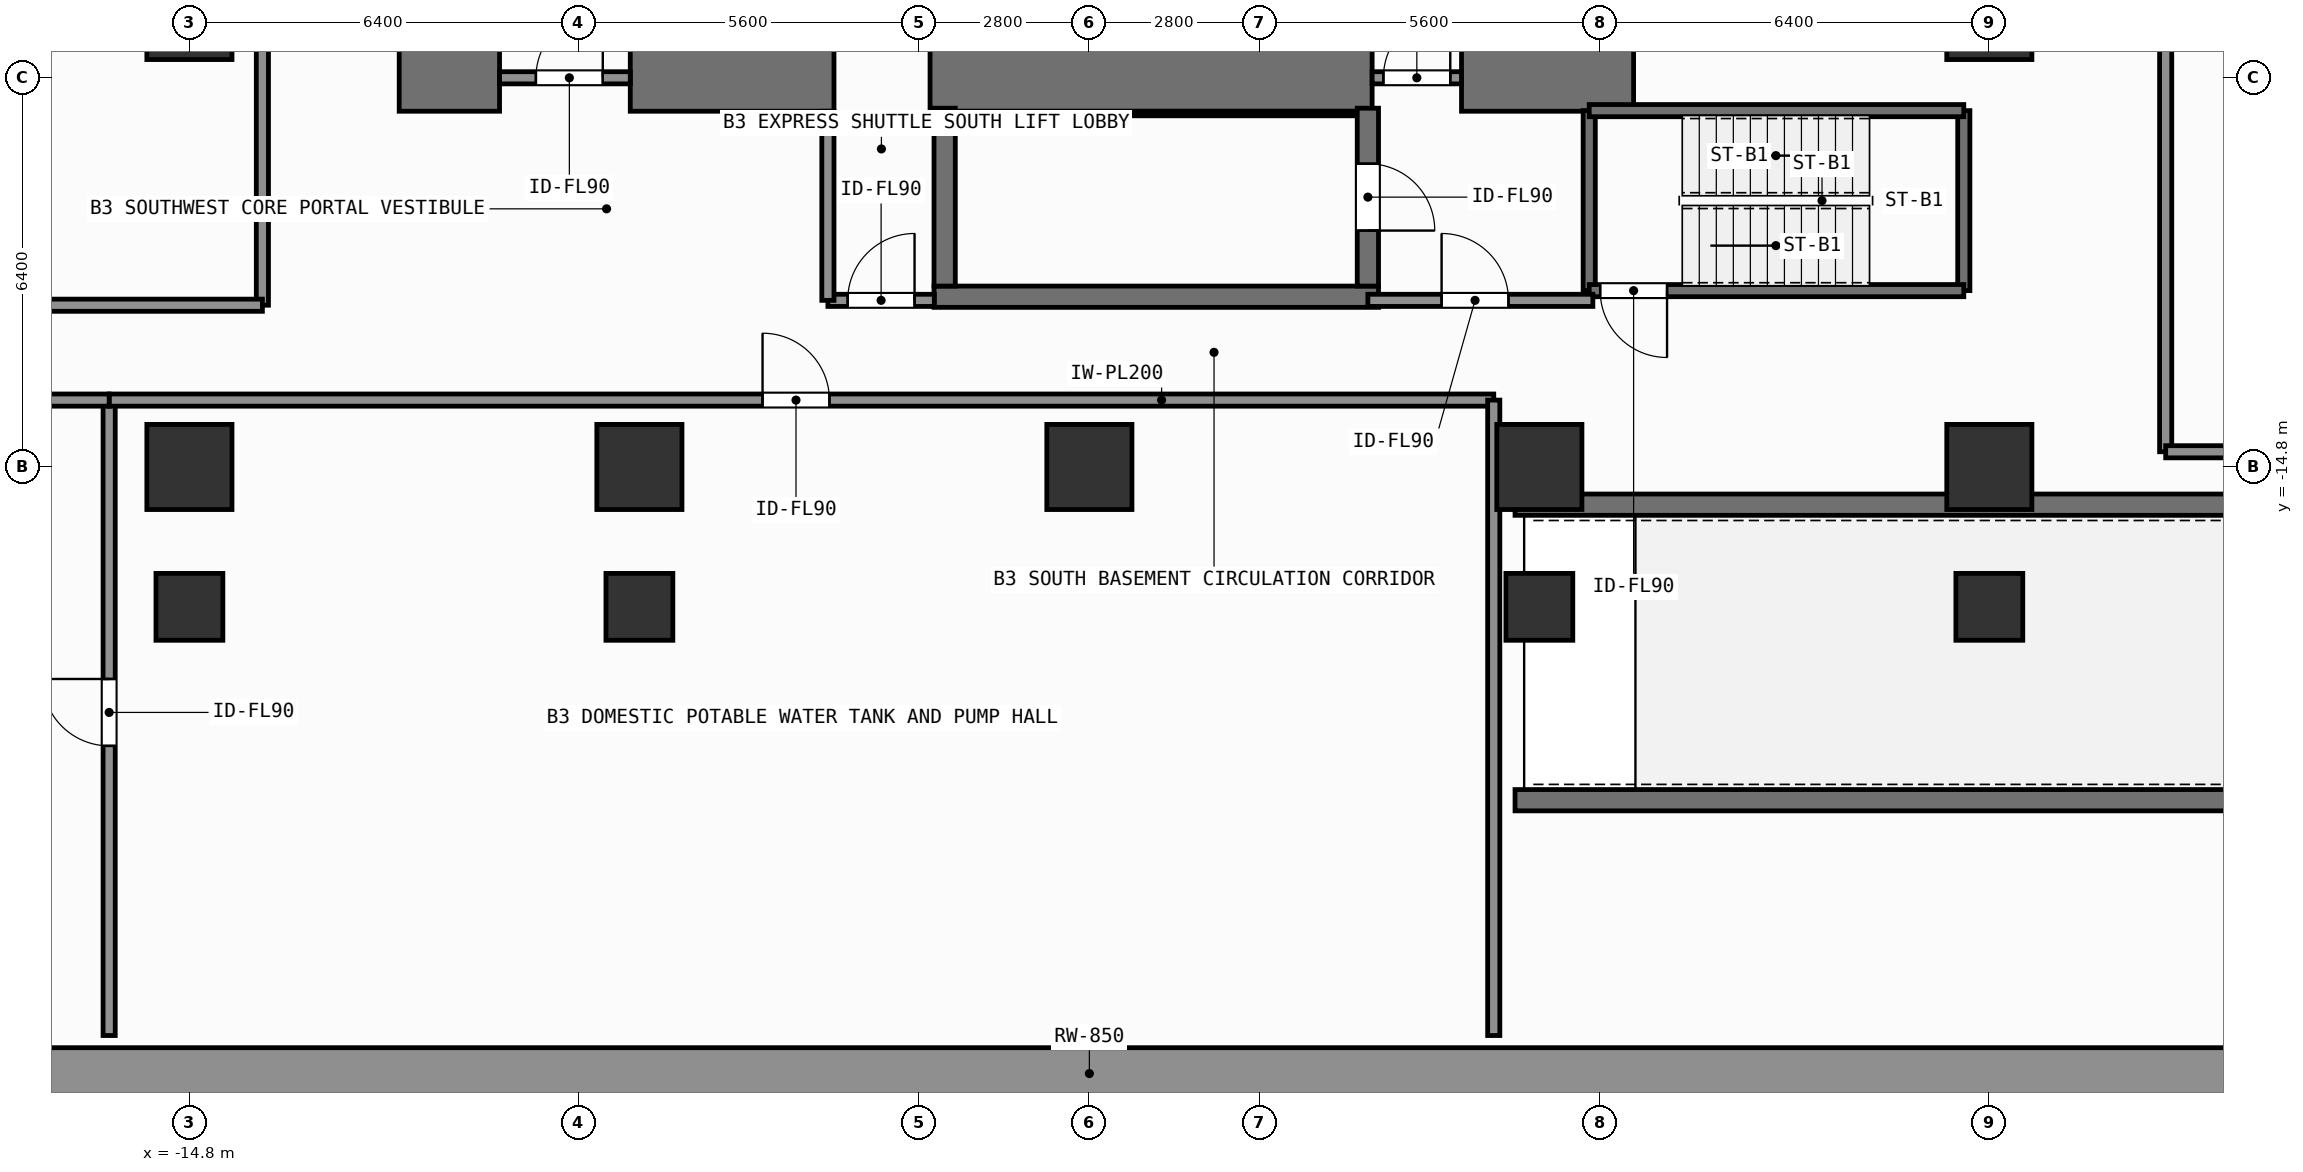
"""IFC4 building model, lengths in metres.
Left out: names, types, materials, properties, quantities, classifications, styles, units other than length and angle.
Written with IfcOpenShell. Run it as: python <this file> out.ifc"""

import sys

from ifc_helpers import new_model, si_unit, direction, frame, frame_2d, origin, origin_2d, place, context, subcontext, project, spatial, rectangle, extrude, element, fill, save


model = new_model("IFC4")
c1 = context("Model", 3, precision=1e-05, world=origin(), true_north=direction((0.0, 1.0)))
c2 = subcontext(c1, "Body", "Model", "MODEL_VIEW")
j1 = project(units=[si_unit("LENGTHUNIT", "METRE"), si_unit("PLANEANGLEUNIT", "RADIAN")], contexts=[c1])
p1 = place(None, origin())
s1 = spatial("IfcSite", under=j1, at=p1, CompositionType="ELEMENT")
p2 = place(p1, origin())
s2 = spatial("IfcBuilding", under=s1, at=p2, CompositionType="ELEMENT")
p3 = place(p2, frame((0.0, 0.0, -12.6)))
s3 = spatial("IfcBuildingStorey", under=s2, at=p3, CompositionType="ELEMENT", Elevation=-12.6)
p4 = place(p3, frame((-33.6, -24.775, 0.0), z_axis=(0.0, 0.0, 1.0), x_axis=(1.0, 0.0, 0.0)))
e1 = element("IfcWall", 1, at=p4, inside=s3, PredefinedType="SOLIDWALL", context=c2, shape_type="SweptSolid", body=[
    extrude(rectangle(XDim=67.2, YDim=0.85, at=frame_2d((33.6, 0.0))), origin(), (0.0, 0.0, 1.0), 4.2),
])
p5 = place(p3, frame((7.0, -20.28, 0.0), z_axis=(0.0, 0.0, 1.0), x_axis=(1.0, 0.0, 0.0)))
e2 = element("IfcWall", 2, at=p5, inside=s3, PredefinedType="SHEAR", context=c2, shape_type="SweptSolid", body=[
    extrude(rectangle(XDim=25.5, YDim=0.35, at=frame_2d((12.75, 0.0))), origin(), (0.0, 0.0, 1.0), 4.2),
])
p6 = place(p3, frame((7.0, -15.42, 0.0), z_axis=(0.0, 0.0, 1.0), x_axis=(1.0, 0.0, 0.0)))
e3 = element("IfcWall", 3, at=p6, inside=s3, PredefinedType="SHEAR", context=c2, shape_type="SweptSolid", body=[
    extrude(rectangle(XDim=25.75, YDim=0.35, at=frame_2d((12.875, 0.0))), origin(), (0.0, 0.0, 1.0), 4.2),
])
p7 = place(p3, frame((-11.35, -8.4, 0.0), z_axis=(0.0, 0.0, 1.0), x_axis=(1.0, 0.0, 0.0)))
e4 = element("IfcWall", 4, at=p7, inside=s3, PredefinedType="SHEAR", context=c2, shape_type="SweptSolid", body=[
    extrude(rectangle(XDim=1.65, YDim=1.1, at=frame_2d((0.825, 0.0))), origin(), (0.0, 0.0, 1.0), 4.2),
])
p8 = place(p3, frame((-7.55, -8.4, 0.0), z_axis=(0.0, 0.0, 1.0), x_axis=(1.0, 0.0, 0.0)))
e5 = element("IfcWall", 5, at=p8, inside=s3, PredefinedType="SHEAR", context=c2, shape_type="SweptSolid", body=[
    extrude(rectangle(XDim=3.35, YDim=1.1, at=frame_2d((1.675, 0.0))), origin(), (0.0, 0.0, 1.0), 4.2),
])
p9 = place(p3, frame((-2.62, -8.4, 0.0), z_axis=(0.0, 0.0, 1.0), x_axis=(1.0, 0.0, 0.0)))
e6 = element("IfcWall", 6, at=p9, inside=s3, PredefinedType="SHEAR", context=c2, shape_type="SweptSolid", body=[
    extrude(rectangle(XDim=7.27, YDim=1.1, at=frame_2d((3.635, 0.0))), origin(), (0.0, 0.0, 1.0), 4.2),
])
p10 = place(p3, frame((6.12, -8.4, 0.0), z_axis=(0.0, 0.0, 1.0), x_axis=(1.0, 0.0, 0.0)))
e7 = element("IfcWall", 7, at=p10, inside=s3, PredefinedType="SHEAR", context=c2, shape_type="SweptSolid", body=[
    extrude(rectangle(XDim=2.83, YDim=1.1, at=frame_2d((1.415, 0.0))), origin(), (0.0, 0.0, 1.0), 4.2),
])
p11 = place(p3, frame((-2.555, -12.0, 0.0), z_axis=(0.0, 0.0, 1.0), x_axis=(1.0, 0.0, 0.0)))
e8 = element("IfcWall", 8, at=p11, inside=s3, PredefinedType="SHEAR", context=c2, shape_type="SweptSolid", body=[
    extrude(rectangle(XDim=7.31, YDim=0.35, at=frame_2d((3.655, 0.0))), origin(), (0.0, 0.0, 1.0), 4.2),
])
p12 = place(p3, frame((-2.2, -8.988, 0.0), z_axis=(0.0, 0.0, 1.0), x_axis=(1.0, 0.0, 0.0)))
e9 = element("IfcWall", 9, at=p12, inside=s3, PredefinedType="SHEAR", context=c2, shape_type="SweptSolid", body=[
    extrude(rectangle(XDim=6.6, YDim=0.075, at=frame_2d((3.3, 0.0))), origin(), (0.0, 0.0, 1.0), 4.2),
])
p13 = place(p3, frame((-2.38, -11.825, 0.0), z_axis=(0.0, 0.0, 1.0), x_axis=(0.0, 1.0, 0.0)))
e10 = element("IfcWall", 10, at=p13, inside=s3, PredefinedType="SHEAR", context=c2, shape_type="SweptSolid", body=[
    extrude(rectangle(XDim=2.925, YDim=0.35, at=frame_2d((1.462, 0.0))), origin(), (0.0, 0.0, 1.0), 4.2),
])
p14 = place(p3, frame((4.58, -8.9, 0.0), z_axis=(0.0, 0.0, 1.0), x_axis=(0.0, -1.0, 0.0)))
e11 = element("IfcWall", 11, at=p14, inside=s3, PredefinedType="SHEAR", context=c2, shape_type="SweptSolid", body=[
    extrude(rectangle(XDim=2.925, YDim=0.35, at=frame_2d((1.462, 0.0))), origin(), (0.0, 0.0, 1.0), 4.2),
])
p15 = place(p14, frame((0.913, 0.0, 0.0)))
e12 = element("IfcOpeningElement", 12, at=p15, cuts=e11, PredefinedType="OPENING", context=c2, shape_type="SweptSolid", body=[
    extrude(rectangle(XDim=1.1, YDim=2.15, at=frame_2d((0.55, 1.075))), frame((0.0, 0.185, 0.0), z_axis=(0.0, -1.0, 0.0), x_axis=(1.0, 0.0, 0.0)), (0.0, 0.0, 1.0), 0.37),
])
for number, where, z_axis, x_axis in (
    (13, (-14.8, -14.8, 0.0), (0.0, 0.0, 1.0), (1.0, 0.0, 0.0)),
    (14, (-7.4, -14.8, 0.0), (0.0, 0.0, 1.0), (1.0, 0.0, 0.0)),
    (15, (0.0, -14.8, 0.0), (0.0, 0.0, 1.0), (1.0, 0.0, 0.0)),
    (16, (7.4, -14.8, 0.0), (0.0, 0.0, 1.0), (1.0, 0.0, 0.0)),
    (17, (14.8, -14.8, 0.0), (0.0, 0.0, 1.0), (1.0, 0.0, 0.0)),
    (18, (-14.8, -7.4, 0.0), (0.0, 0.0, 1.0), (1.0, 0.0, 0.0)),
    (19, (14.8, -7.4, 0.0), (0.0, 0.0, 1.0), (1.0, 0.0, 0.0)),
):
    element("IfcColumn", number, at=place(p3, frame(where, z_axis=z_axis, x_axis=x_axis)), inside=s3, PredefinedType="COLUMN", context=c2, shape_type="SweptSolid", body=[
        extrude(rectangle(XDim=1.4, YDim=1.4, at=origin_2d()), origin(), (0.0, 0.0, 1.0), 4.2),
    ])
for number, where, z_axis, x_axis in (
    (20, (-14.8, -17.1, 0.0), (0.0, 0.0, 1.0), (1.0, 0.0, 0.0)),
    (21, (-7.4, -17.1, 0.0), (0.0, 0.0, 1.0), (1.0, 0.0, 0.0)),
    (22, (7.4, -17.1, 0.0), (0.0, 0.0, 1.0), (1.0, 0.0, 0.0)),
    (23, (14.8, -17.1, 0.0), (0.0, 0.0, 1.0), (1.0, 0.0, 0.0)),
):
    element("IfcColumn", number, at=place(p3, frame(where, z_axis=z_axis, x_axis=x_axis)), inside=s3, PredefinedType="COLUMN", context=c2, shape_type="SweptSolid", body=[
        extrude(rectangle(XDim=1.1, YDim=1.1, at=origin_2d()), origin(), (0.0, 0.0, 1.0), 4.2),
    ])
for number, where, z_axis, x_axis in (
    (24, (8.22, -11.9, 0.0), (0.0, 0.0, 1.0), (0.0, 1.0, 0.0)),
    (25, (14.38, -8.94, 0.0), (0.0, 0.0, 1.0), (0.0, -1.0, 0.0)),
):
    element("IfcWall", number, at=place(p3, frame(where, z_axis=z_axis, x_axis=x_axis)), inside=s3, PredefinedType="SHEAR", context=c2, shape_type="SweptSolid", body=[
        extrude(rectangle(XDim=2.96, YDim=0.2, at=frame_2d((1.48, 0.0))), origin(), (0.0, 0.0, 1.0), 3.94),
    ])
p16 = place(p3, frame((14.38, -11.9, 0.0), z_axis=(0.0, 0.0, 1.0), x_axis=(-1.0, 0.0, 0.0)))
e26 = element("IfcWall", 26, at=p16, inside=s3, PredefinedType="SHEAR", context=c2, shape_type="SweptSolid", body=[
    extrude(rectangle(XDim=6.16, YDim=0.2, at=frame_2d((3.08, 0.0))), origin(), (0.0, 0.0, 1.0), 3.94),
])
p17 = place(p16, frame((4.88, 0.0, 0.0)))
e27 = element("IfcOpeningElement", 27, at=p17, cuts=e26, PredefinedType="OPENING", context=c2, shape_type="SweptSolid", body=[
    extrude(rectangle(XDim=1.1, YDim=2.15, at=frame_2d((0.55, 1.075))), frame((0.0, 0.11, 0.0), z_axis=(0.0, -1.0, 0.0), x_axis=(1.0, 0.0, 0.0)), (0.0, 0.0, 1.0), 0.22),
])
p18 = place(p3, frame((8.22, -8.94, 0.0), z_axis=(0.0, 0.0, 1.0), x_axis=(1.0, 0.0, 0.0)))
e28 = element("IfcWall", 28, at=p18, inside=s3, PredefinedType="SHEAR", context=c2, shape_type="SweptSolid", body=[
    extrude(rectangle(XDim=6.16, YDim=0.2, at=frame_2d((3.08, 0.0))), origin(), (0.0, 0.0, 1.0), 3.94),
])
p19 = place(p3, frame((4.58, -12.06, 0.0), z_axis=(0.0, 0.0, 1.0), x_axis=(1.0, 0.0, 0.0)))
e29 = element("IfcWall", 29, at=p19, inside=s3, PredefinedType="SOLIDWALL", context=c2, shape_type="SweptSolid", body=[
    extrude(rectangle(XDim=3.7, YDim=0.2, at=frame_2d((1.85, 0.0))), origin(), (0.0, 0.0, 1.0), 3.94),
])
p20 = place(p19, frame((1.212, 0.0, 0.0)))
e30 = element("IfcOpeningElement", 30, at=p20, cuts=e29, PredefinedType="OPENING", context=c2, shape_type="SweptSolid", body=[
    extrude(rectangle(XDim=1.1, YDim=2.15, at=frame_2d((0.55, 1.075))), frame((0.0, 0.11, 0.0), z_axis=(0.0, -1.0, 0.0), x_axis=(1.0, 0.0, 0.0)), (0.0, 0.0, 1.0), 0.22),
])
p21 = place(p3, frame((4.65, -8.4, 0.0), z_axis=(0.0, 0.0, 1.0), x_axis=(1.0, 0.0, 0.0)))
e31 = element("IfcWall", 31, at=p21, inside=s3, PredefinedType="SOLIDWALL", context=c2, shape_type="SweptSolid", body=[
    extrude(rectangle(XDim=1.47, YDim=0.2, at=frame_2d((0.735, 0.0))), origin(), (0.0, 0.0, 1.0), 2.98),
])
p22 = place(p21, frame((0.185, 0.0, 0.0)))
e32 = element("IfcOpeningElement", 32, at=p22, cuts=e31, PredefinedType="OPENING", context=c2, shape_type="SweptSolid", body=[
    extrude(rectangle(XDim=1.1, YDim=2.15, at=frame_2d((0.55, 1.075))), frame((0.0, 0.11, 0.0), z_axis=(0.0, -1.0, 0.0), x_axis=(1.0, 0.0, 0.0)), (0.0, 0.0, 1.0), 0.22),
])
p23 = place(p3, frame((-9.7, -8.4, 0.0), z_axis=(0.0, 0.0, 1.0), x_axis=(1.0, 0.0, 0.0)))
e33 = element("IfcWall", 33, at=p23, inside=s3, PredefinedType="SOLIDWALL", context=c2, shape_type="SweptSolid", body=[
    extrude(rectangle(XDim=2.15, YDim=0.2, at=frame_2d((1.075, 0.0))), origin(), (0.0, 0.0, 1.0), 2.98),
])
p24 = place(p23, frame((0.598, 0.0, 0.0)))
e34 = element("IfcOpeningElement", 34, at=p24, cuts=e33, PredefinedType="OPENING", context=c2, shape_type="SweptSolid", body=[
    extrude(rectangle(XDim=1.1, YDim=2.15, at=frame_2d((0.55, 1.075))), frame((0.0, 0.11, 0.0), z_axis=(0.0, -1.0, 0.0), x_axis=(1.0, 0.0, 0.0)), (0.0, 0.0, 1.0), 0.22),
])
p25 = place(p3, frame((-4.3, -12.06, 0.0), z_axis=(0.0, 0.0, 1.0), x_axis=(1.0, 0.0, 0.0)))
e35 = element("IfcWall", 35, at=p25, inside=s3, PredefinedType="SOLIDWALL", context=c2, shape_type="SweptSolid", body=[
    extrude(rectangle(XDim=1.75, YDim=0.2, at=frame_2d((0.875, 0.0))), origin(), (0.0, 0.0, 1.0), 3.94),
])
p26 = place(p25, frame((0.325, 0.0, 0.0)))
e36 = element("IfcOpeningElement", 36, at=p26, cuts=e35, PredefinedType="OPENING", context=c2, shape_type="SweptSolid", body=[
    extrude(rectangle(XDim=1.1, YDim=2.15, at=frame_2d((0.55, 1.075))), frame((0.0, 0.11, 0.0), z_axis=(0.0, -1.0, 0.0), x_axis=(1.0, 0.0, 0.0)), (0.0, 0.0, 1.0), 0.22),
])
p27 = place(p3, frame((-13.6, -12.14, 0.0), z_axis=(0.0, 0.0, 1.0), x_axis=(0.0, 1.0, 0.0)))
e37 = element("IfcWall", 37, at=p27, inside=s3, PredefinedType="SOLIDWALL", context=c2, shape_type="SweptSolid", body=[
    extrude(rectangle(XDim=16.64, YDim=0.2, at=frame_2d((8.32, 0.0))), origin(), (0.0, 0.0, 1.0), 3.94),
])
p28 = place(p27, frame((6.964, 0.0, 0.0)))
e38 = element("IfcOpeningElement", 38, at=p28, cuts=e37, PredefinedType="OPENING", context=c2, shape_type="SweptSolid", body=[
    extrude(rectangle(XDim=1.1, YDim=2.15, at=frame_2d((0.55, 1.075))), frame((0.0, 0.11, 0.0), z_axis=(0.0, -1.0, 0.0), x_axis=(1.0, 0.0, 0.0)), (0.0, 0.0, 1.0), 0.22),
])
p29 = place(p3, frame((17.7, -14.55, 0.0), z_axis=(0.0, 0.0, 1.0), x_axis=(0.0, 1.0, 0.0)))
e39 = element("IfcWall", 39, at=p29, inside=s3, PredefinedType="SOLIDWALL", context=c2, shape_type="SweptSolid", body=[
    extrude(rectangle(XDim=28.25, YDim=0.2, at=frame_2d((14.125, 0.0))), origin(), (0.0, 0.0, 1.0), 3.94),
])
p30 = place(p29, frame((15.006, 0.0, 0.0)))
e40 = element("IfcOpeningElement", 40, at=p30, cuts=e39, PredefinedType="OPENING", context=c2, shape_type="SweptSolid", body=[
    extrude(rectangle(XDim=1.1, YDim=2.15, at=frame_2d((0.55, 1.075))), frame((0.0, 0.11, 0.0), z_axis=(0.0, -1.0, 0.0), x_axis=(1.0, 0.0, 0.0)), (0.0, 0.0, 1.0), 0.22),
])
p31 = place(p3, frame((-16.12, -24.15, 0.0), z_axis=(0.0, 0.0, 1.0), x_axis=(0.0, 1.0, 0.0)))
e41 = element("IfcWall", 41, at=p31, inside=s3, PredefinedType="SOLIDWALL", context=c2, shape_type="SweptSolid", body=[
    extrude(rectangle(XDim=10.45, YDim=0.2, at=frame_2d((5.225, 0.0))), origin(), (0.0, 0.0, 1.0), 3.94),
])
p32 = place(p31, frame((4.763, 0.0, 0.0)))
e42 = element("IfcOpeningElement", 42, at=p32, cuts=e41, PredefinedType="OPENING", context=c2, shape_type="SweptSolid", body=[
    extrude(rectangle(XDim=1.1, YDim=2.15, at=frame_2d((0.55, 1.075))), frame((0.0, 0.11, 0.0), z_axis=(0.0, -1.0, 0.0), x_axis=(1.0, 0.0, 0.0)), (0.0, 0.0, 1.0), 0.22),
])
p33 = place(p3, frame((-16.12, -13.7, 0.0), z_axis=(0.0, 0.0, 1.0), x_axis=(1.0, 0.0, 0.0)))
e43 = element("IfcWall", 43, at=p33, inside=s3, PredefinedType="SOLIDWALL", context=c2, shape_type="SweptSolid", body=[
    extrude(rectangle(XDim=22.77, YDim=0.2, at=frame_2d((11.385, 0.0))), origin(), (0.0, 0.0, 1.0), 3.94),
])
p34 = place(p33, frame((10.745, 0.0, 0.0)))
e44 = element("IfcOpeningElement", 44, at=p34, cuts=e43, PredefinedType="OPENING", context=c2, shape_type="SweptSolid", body=[
    extrude(rectangle(XDim=1.1, YDim=2.15, at=frame_2d((0.55, 1.075))), frame((0.0, 0.11, 0.0), z_axis=(0.0, -1.0, 0.0), x_axis=(1.0, 0.0, 0.0)), (0.0, 0.0, 1.0), 0.22),
])
p35 = place(p3, frame((-4.3, -12.06, 0.0), z_axis=(0.0, 0.0, 1.0), x_axis=(0.0, 1.0, 0.0)))
e45 = element("IfcWall", 45, at=p35, inside=s3, PredefinedType="SOLIDWALL", context=c2, shape_type="SweptSolid", body=[
    extrude(rectangle(XDim=3.11, YDim=0.2, at=frame_2d((1.555, 0.0))), origin(), (0.0, 0.0, 1.0), 3.94),
])
p36 = place(p3, frame((-32.65, -12.14, 0.0), z_axis=(0.0, 0.0, 1.0), x_axis=(1.0, 0.0, 0.0)))
e46 = element("IfcWall", 46, at=p36, inside=s3, PredefinedType="SOLIDWALL", context=c2, shape_type="SweptSolid", body=[
    extrude(rectangle(XDim=19.05, YDim=0.2, at=frame_2d((9.525, 0.0))), origin(), (0.0, 0.0, 1.0), 3.94),
])
p37 = place(p3, frame((17.7, -14.55, 0.0), z_axis=(0.0, 0.0, 1.0), x_axis=(1.0, 0.0, 0.0)))
e47 = element("IfcWall", 47, at=p37, inside=s3, PredefinedType="SOLIDWALL", context=c2, shape_type="SweptSolid", body=[
    extrude(rectangle(XDim=14.95, YDim=0.2, at=frame_2d((7.475, 0.0))), origin(), (0.0, 0.0, 1.0), 3.23),
])
p38 = place(p3, frame((-32.65, -13.7, 0.0), z_axis=(0.0, 0.0, 1.0), x_axis=(1.0, 0.0, 0.0)))
e48 = element("IfcWall", 48, at=p38, inside=s3, PredefinedType="SOLIDWALL", context=c2, shape_type="SweptSolid", body=[
    extrude(rectangle(XDim=16.53, YDim=0.2, at=frame_2d((8.265, 0.0))), origin(), (0.0, 0.0, 1.0), 3.94),
])
p39 = place(p3, frame((6.65, -24.15, 0.0), z_axis=(0.0, 0.0, 1.0), x_axis=(0.0, 1.0, 0.0)))
e49 = element("IfcWall", 49, at=p39, inside=s3, PredefinedType="SOLIDWALL", context=c2, shape_type="SweptSolid", body=[
    extrude(rectangle(XDim=10.45, YDim=0.2, at=frame_2d((5.225, 0.0))), origin(), (0.0, 0.0, 1.0), 3.94),
])
p40 = place(p15, origin())
e50 = element("IfcDoor", 50, at=p40, inside=s3, OperationType="SINGLE_SWING_RIGHT", PredefinedType="DOOR", context=c2, shape_type="SweptSolid", body=[
    extrude(rectangle(XDim=1.1, YDim=2.15, at=frame_2d((0.55, 1.075))), frame((0.0, 0.025, 0.0), z_axis=(0.0, -1.0, 0.0), x_axis=(1.0, 0.0, 0.0)), (0.0, 0.0, 1.0), 0.05),
])
fill(e12, e50)
p41 = place(p17, origin())
e51 = element("IfcDoor", 51, at=p41, inside=s3, OperationType="SINGLE_SWING_LEFT", PredefinedType="DOOR", context=c2, shape_type="SweptSolid", body=[
    extrude(rectangle(XDim=1.1, YDim=2.15, at=frame_2d((0.55, 1.075))), frame((0.0, 0.025, 0.0), z_axis=(0.0, -1.0, 0.0), x_axis=(1.0, 0.0, 0.0)), (0.0, 0.0, 1.0), 0.05),
])
fill(e27, e51)
p42 = place(p20, origin())
e52 = element("IfcDoor", 52, at=p42, inside=s3, OperationType="SINGLE_SWING_LEFT", PredefinedType="DOOR", context=c2, shape_type="SweptSolid", body=[
    extrude(rectangle(XDim=1.1, YDim=2.15, at=frame_2d((0.55, 1.075))), frame((0.0, 0.025, 0.0), z_axis=(0.0, -1.0, 0.0), x_axis=(1.0, 0.0, 0.0)), (0.0, 0.0, 1.0), 0.05),
])
fill(e30, e52)
p43 = place(p22, origin())
e53 = element("IfcDoor", 53, at=p43, inside=s3, OperationType="SINGLE_SWING_RIGHT", PredefinedType="DOOR", context=c2, shape_type="SweptSolid", body=[
    extrude(rectangle(XDim=1.1, YDim=2.15, at=frame_2d((0.55, 1.075))), frame((0.0, 0.025, 0.0), z_axis=(0.0, -1.0, 0.0), x_axis=(1.0, 0.0, 0.0)), (0.0, 0.0, 1.0), 0.05),
])
fill(e32, e53)
p44 = place(p24, origin())
e54 = element("IfcDoor", 54, at=p44, inside=s3, OperationType="SINGLE_SWING_RIGHT", PredefinedType="DOOR", context=c2, shape_type="SweptSolid", body=[
    extrude(rectangle(XDim=1.1, YDim=2.15, at=frame_2d((0.55, 1.075))), frame((0.0, 0.025, 0.0), z_axis=(0.0, -1.0, 0.0), x_axis=(1.0, 0.0, 0.0)), (0.0, 0.0, 1.0), 0.05),
])
fill(e34, e54)
p45 = place(p26, origin())
e55 = element("IfcDoor", 55, at=p45, inside=s3, OperationType="SINGLE_SWING_RIGHT", PredefinedType="DOOR", context=c2, shape_type="SweptSolid", body=[
    extrude(rectangle(XDim=1.1, YDim=2.15, at=frame_2d((0.55, 1.075))), frame((0.0, 0.025, 0.0), z_axis=(0.0, -1.0, 0.0), x_axis=(1.0, 0.0, 0.0)), (0.0, 0.0, 1.0), 0.05),
])
fill(e36, e55)
p46 = place(p32, origin())
e56 = element("IfcDoor", 56, at=p46, inside=s3, OperationType="SINGLE_SWING_RIGHT", PredefinedType="DOOR", context=c2, shape_type="SweptSolid", body=[
    extrude(rectangle(XDim=1.1, YDim=2.15, at=frame_2d((0.55, 1.075))), frame((0.0, 0.025, 0.0), z_axis=(0.0, -1.0, 0.0), x_axis=(1.0, 0.0, 0.0)), (0.0, 0.0, 1.0), 0.05),
])
fill(e42, e56)
p47 = place(p34, origin())
e57 = element("IfcDoor", 57, at=p47, inside=s3, OperationType="SINGLE_SWING_LEFT", PredefinedType="DOOR", context=c2, shape_type="SweptSolid", body=[
    extrude(rectangle(XDim=1.1, YDim=2.15, at=frame_2d((0.55, 1.075))), frame((0.0, 0.025, 0.0), z_axis=(0.0, -1.0, 0.0), x_axis=(1.0, 0.0, 0.0)), (0.0, 0.0, 1.0), 0.05),
])
fill(e44, e57)
save(model, sys.argv[1])
